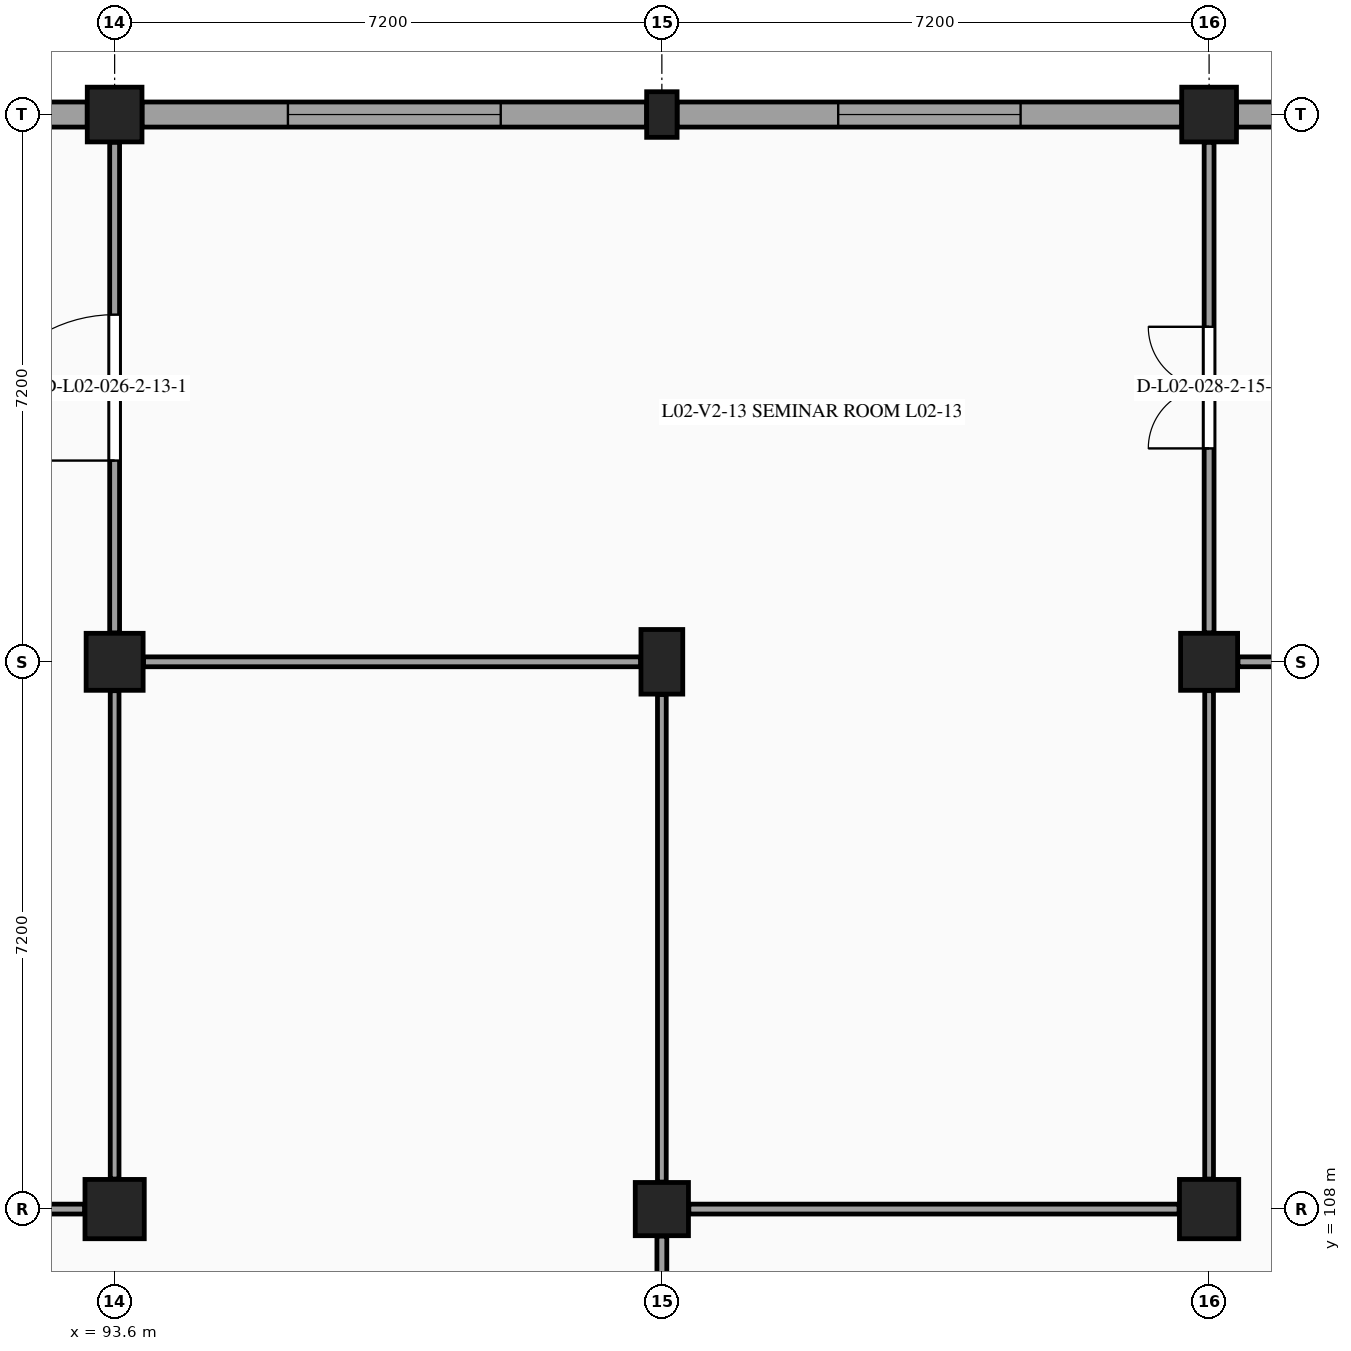
"""IFC4 building model, lengths in metres.
Left out: names, types, materials, properties, quantities, classifications, styles, units other than length and angle.
Written with IfcOpenShell. Run it as: python <this file> out.ifc"""

import sys

from ifc_helpers import new_model, si_unit, direction, frame, frame_2d, origin, origin_2d, place, context, subcontext, project, spatial, rectangle, extrude, element, fill, save


model = new_model("IFC4")
c1 = context("Model", 3, precision=1e-05, world=origin(), true_north=direction((0.0, 1.0)))
c2 = subcontext(c1, "Body", "Model", "MODEL_VIEW")
j1 = project(units=[si_unit("LENGTHUNIT", "METRE"), si_unit("PLANEANGLEUNIT", "RADIAN")], contexts=[c1])
p1 = place(None, origin())
s1 = spatial("IfcSite", under=j1, at=p1, CompositionType="ELEMENT")
p2 = place(p1, origin())
s2 = spatial("IfcBuilding", under=s1, at=p2, CompositionType="ELEMENT")
p3 = place(p2, frame((0.0, 0.0, 9.9)))
s3 = spatial("IfcBuildingStorey", under=s2, at=p3, CompositionType="ELEMENT", Elevation=9.9)
p4 = place(p3, frame((93.6, 108.0, 0.0), z_axis=(0.0, 0.0, 1.0), x_axis=(1.0, 0.0, 0.0)))
e1 = element("IfcColumn", 1, at=p4, inside=s3, PredefinedType="COLUMN", context=c2, shape_type="SweptSolid", body=[
    extrude(rectangle(XDim=0.78, YDim=0.78, at=origin_2d()), origin(), (0.0, 0.0, 1.0), 4.5),
])
p5 = place(p3, frame((93.6, 115.2, 0.0), z_axis=(0.0, 0.0, 1.0), x_axis=(1.0, 0.0, 0.0)))
e2 = element("IfcColumn", 2, at=p5, inside=s3, PredefinedType="COLUMN", context=c2, shape_type="SweptSolid", body=[
    extrude(rectangle(XDim=0.75, YDim=0.75, at=origin_2d()), origin(), (0.0, 0.0, 1.0), 4.5),
])
p6 = place(p3, frame((93.6, 122.4, 0.0), z_axis=(0.0, 0.0, 1.0), x_axis=(1.0, 0.0, 0.0)))
e3 = element("IfcColumn", 3, at=p6, inside=s3, PredefinedType="COLUMN", context=c2, shape_type="SweptSolid", body=[
    extrude(rectangle(XDim=0.72, YDim=0.72, at=origin_2d()), origin(), (0.0, 0.0, 1.0), 4.5),
])
p7 = place(p3, frame((100.8, 108.0, 0.0), z_axis=(0.0, 0.0, 1.0), x_axis=(1.0, 0.0, 0.0)))
e4 = element("IfcColumn", 4, at=p7, inside=s3, PredefinedType="COLUMN", context=c2, shape_type="SweptSolid", body=[
    extrude(rectangle(XDim=0.7, YDim=0.7, at=origin_2d()), origin(), (0.0, 0.0, 1.0), 4.5),
])
p8 = place(p3, frame((100.8, 115.2, 0.0), z_axis=(0.0, 0.0, 1.0), x_axis=(1.0, 0.0, 0.0)))
e5 = element("IfcColumn", 5, at=p8, inside=s3, PredefinedType="COLUMN", context=c2, shape_type="SweptSolid", body=[
    extrude(rectangle(XDim=0.55, YDim=0.85, at=origin_2d()), origin(), (0.0, 0.0, 1.0), 4.5),
])
p9 = place(p3, frame((100.8, 122.4, 0.0), z_axis=(0.0, 0.0, 1.0), x_axis=(1.0, 0.0, 0.0)))
e6 = element("IfcColumn", 6, at=p9, inside=s3, PredefinedType="PILASTER", context=c2, shape_type="SweptSolid", body=[
    extrude(rectangle(XDim=0.4, YDim=0.6, at=origin_2d()), origin(), (0.0, 0.0, 1.0), 4.5),
])
p10 = place(p3, frame((108.0, 108.0, 0.0), z_axis=(0.0, 0.0, 1.0), x_axis=(1.0, 0.0, 0.0)))
e7 = element("IfcColumn", 7, at=p10, inside=s3, PredefinedType="COLUMN", context=c2, shape_type="SweptSolid", body=[
    extrude(rectangle(XDim=0.78, YDim=0.78, at=origin_2d()), origin(), (0.0, 0.0, 1.0), 4.5),
])
p11 = place(p3, frame((108.0, 115.2, 0.0), z_axis=(0.0, 0.0, 1.0), x_axis=(1.0, 0.0, 0.0)))
e8 = element("IfcColumn", 8, at=p11, inside=s3, PredefinedType="COLUMN", context=c2, shape_type="SweptSolid", body=[
    extrude(rectangle(XDim=0.75, YDim=0.75, at=origin_2d()), origin(), (0.0, 0.0, 1.0), 4.5),
])
p12 = place(p3, frame((108.0, 122.4, 0.0), z_axis=(0.0, 0.0, 1.0), x_axis=(1.0, 0.0, 0.0)))
e9 = element("IfcColumn", 9, at=p12, inside=s3, PredefinedType="COLUMN", context=c2, shape_type="SweptSolid", body=[
    extrude(rectangle(XDim=0.72, YDim=0.72, at=origin_2d()), origin(), (0.0, 0.0, 1.0), 4.5),
])
p13 = place(p3, frame((86.6, 122.4, 0.0), z_axis=(0.0, 0.0, 1.0), x_axis=(1.0, 0.0, 0.0)))
e10 = element("IfcWall", 10, at=p13, inside=s3, PredefinedType="STANDARD", context=c2, shape_type="SweptSolid", body=[
    extrude(rectangle(XDim=6.64, YDim=0.33, at=frame_2d((3.32, 0.0))), origin(), (0.0, 0.0, 1.0), 3.47),
])
p14 = place(p13, frame((1.72, 0.0, 0.98)))
e11 = element("IfcOpeningElement", 11, at=p14, cuts=e10, PredefinedType="OPENING", context=c2, shape_type="SweptSolid", body=[
    extrude(rectangle(XDim=3.2, YDim=1.45, at=frame_2d((1.6, 0.725))), frame((0.0, 0.175, 0.0), z_axis=(0.0, -1.0, 0.0), x_axis=(1.0, 0.0, 0.0)), (0.0, 0.0, 1.0), 0.35),
])
p15 = place(p3, frame((93.96, 122.4, 0.0), z_axis=(0.0, 0.0, 1.0), x_axis=(1.0, 0.0, 0.0)))
e12 = element("IfcWall", 12, at=p15, inside=s3, PredefinedType="STANDARD", context=c2, shape_type="SweptSolid", body=[
    extrude(rectangle(XDim=6.64, YDim=0.33, at=frame_2d((3.32, 0.0))), origin(), (0.0, 0.0, 1.0), 3.47),
])
p16 = place(p15, frame((1.92, 0.0, 0.98)))
e13 = element("IfcOpeningElement", 13, at=p16, cuts=e12, PredefinedType="OPENING", context=c2, shape_type="SweptSolid", body=[
    extrude(rectangle(XDim=2.8, YDim=1.45, at=frame_2d((1.4, 0.725))), frame((0.0, 0.175, 0.0), z_axis=(0.0, -1.0, 0.0), x_axis=(1.0, 0.0, 0.0)), (0.0, 0.0, 1.0), 0.35),
])
p17 = place(p3, frame((101.0, 122.4, 0.0), z_axis=(0.0, 0.0, 1.0), x_axis=(1.0, 0.0, 0.0)))
e14 = element("IfcWall", 14, at=p17, inside=s3, PredefinedType="STANDARD", context=c2, shape_type="SweptSolid", body=[
    extrude(rectangle(XDim=6.64, YDim=0.33, at=frame_2d((3.32, 0.0))), origin(), (0.0, 0.0, 1.0), 3.47),
])
p18 = place(p17, frame((2.12, 0.0, 0.98)))
e15 = element("IfcOpeningElement", 15, at=p18, cuts=e14, PredefinedType="OPENING", context=c2, shape_type="SweptSolid", body=[
    extrude(rectangle(XDim=2.4, YDim=1.4, at=frame_2d((1.2, 0.7))), frame((0.0, 0.175, 0.0), z_axis=(0.0, -1.0, 0.0), x_axis=(1.0, 0.0, 0.0)), (0.0, 0.0, 1.0), 0.35),
])
p19 = place(p3, frame((108.36, 122.4, 0.0), z_axis=(0.0, 0.0, 1.0), x_axis=(1.0, 0.0, 0.0)))
e16 = element("IfcWall", 16, at=p19, inside=s3, PredefinedType="STANDARD", context=c2, shape_type="SweptSolid", body=[
    extrude(rectangle(XDim=6.64, YDim=0.33, at=frame_2d((3.32, 0.0))), origin(), (0.0, 0.0, 1.0), 3.47),
])
p20 = place(p19, frame((0.92, 0.0, 0.98)))
e17 = element("IfcOpeningElement", 17, at=p20, cuts=e16, PredefinedType="OPENING", context=c2, shape_type="SweptSolid", body=[
    extrude(rectangle(XDim=4.8, YDim=1.8, at=frame_2d((2.4, 0.9))), frame((0.0, 0.175, 0.0), z_axis=(0.0, -1.0, 0.0), x_axis=(1.0, 0.0, 0.0)), (0.0, 0.0, 1.0), 0.35),
])
p21 = place(p3, frame((86.755, 108.0, 0.0), z_axis=(0.0, 0.0, 1.0), x_axis=(1.0, 0.0, 0.0)))
e18 = element("IfcWall", 18, at=p21, inside=s3, PredefinedType="PARTITIONING", context=c2, shape_type="SweptSolid", body=[
    extrude(rectangle(XDim=6.45, YDim=0.13, at=frame_2d((3.225, 0.0))), origin(), (0.0, 0.0, 1.0), 3.505),
])
p22 = place(p3, frame((93.6, 108.395, 0.0), z_axis=(0.0, 0.0, 1.0), x_axis=(0.0, 1.0, 0.0)))
e19 = element("IfcWall", 19, at=p22, inside=s3, PredefinedType="PARTITIONING", context=c2, shape_type="SweptSolid", body=[
    extrude(rectangle(XDim=6.425, YDim=0.115, at=frame_2d((3.212, 0.0))), origin(), (0.0, 0.0, 1.0), 3.535),
])
p23 = place(p3, frame((93.6, 115.58, 0.0), z_axis=(0.0, 0.0, 1.0), x_axis=(0.0, 1.0, 0.0)))
e20 = element("IfcWall", 20, at=p23, inside=s3, PredefinedType="PARTITIONING", context=c2, shape_type="SweptSolid", body=[
    extrude(rectangle(XDim=6.455, YDim=0.13, at=frame_2d((3.228, 0.0))), origin(), (0.0, 0.0, 1.0), 3.53),
])
p24 = place(p23, frame((2.268, 0.0, 0.0)))
e21 = element("IfcOpeningElement", 21, at=p24, cuts=e20, PredefinedType="OPENING", context=c2, shape_type="SweptSolid", body=[
    extrude(rectangle(XDim=1.92, YDim=2.35, at=frame_2d((0.96, 1.175))), frame((0.0, 0.075, 0.0), z_axis=(0.0, -1.0, 0.0), x_axis=(1.0, 0.0, 0.0)), (0.0, 0.0, 1.0), 0.15),
])
p25 = place(p3, frame((100.8, 101.165, 0.0), z_axis=(0.0, 0.0, 1.0), x_axis=(0.0, 1.0, 0.0)))
e22 = element("IfcWall", 22, at=p25, inside=s3, PredefinedType="PARTITIONING", context=c2, shape_type="SweptSolid", body=[
    extrude(rectangle(XDim=6.48, YDim=0.13, at=frame_2d((3.24, 0.0))), origin(), (0.0, 0.0, 1.0), 3.54),
])
p26 = place(p25, frame((2.36, 0.0, 0.0)))
e23 = element("IfcOpeningElement", 23, at=p26, cuts=e22, PredefinedType="OPENING", context=c2, shape_type="SweptSolid", body=[
    extrude(rectangle(XDim=1.76, YDim=2.3, at=frame_2d((0.88, 1.15))), frame((0.0, 0.075, 0.0), z_axis=(0.0, -1.0, 0.0), x_axis=(1.0, 0.0, 0.0)), (0.0, 0.0, 1.0), 0.15),
])
p27 = place(p3, frame((100.8, 108.355, 0.0), z_axis=(0.0, 0.0, 1.0), x_axis=(0.0, 1.0, 0.0)))
e24 = element("IfcWall", 24, at=p27, inside=s3, PredefinedType="PARTITIONING", context=c2, shape_type="SweptSolid", body=[
    extrude(rectangle(XDim=6.415, YDim=0.115, at=frame_2d((3.208, 0.0))), origin(), (0.0, 0.0, 1.0), 3.535),
])
p28 = place(p3, frame((93.98, 115.2, 0.0), z_axis=(0.0, 0.0, 1.0), x_axis=(1.0, 0.0, 0.0)))
e25 = element("IfcWall", 25, at=p28, inside=s3, PredefinedType="PARTITIONING", context=c2, shape_type="SweptSolid", body=[
    extrude(rectangle(XDim=6.54, YDim=0.13, at=frame_2d((3.27, 0.0))), origin(), (0.0, 0.0, 1.0), 3.525),
])
p29 = place(p3, frame((101.155, 108.0, 0.0), z_axis=(0.0, 0.0, 1.0), x_axis=(1.0, 0.0, 0.0)))
e26 = element("IfcWall", 26, at=p29, inside=s3, PredefinedType="PARTITIONING", context=c2, shape_type="SweptSolid", body=[
    extrude(rectangle(XDim=6.45, YDim=0.13, at=frame_2d((3.225, 0.0))), origin(), (0.0, 0.0, 1.0), 3.565),
])
p30 = place(p3, frame((108.0, 108.395, 0.0), z_axis=(0.0, 0.0, 1.0), x_axis=(0.0, 1.0, 0.0)))
e27 = element("IfcWall", 27, at=p30, inside=s3, PredefinedType="PARTITIONING", context=c2, shape_type="SweptSolid", body=[
    extrude(rectangle(XDim=6.425, YDim=0.115, at=frame_2d((3.212, 0.0))), origin(), (0.0, 0.0, 1.0), 3.535),
])
p31 = place(p3, frame((108.0, 115.58, 0.0), z_axis=(0.0, 0.0, 1.0), x_axis=(0.0, 1.0, 0.0)))
e28 = element("IfcWall", 28, at=p31, inside=s3, PredefinedType="PARTITIONING", context=c2, shape_type="SweptSolid", body=[
    extrude(rectangle(XDim=6.455, YDim=0.13, at=frame_2d((3.228, 0.0))), origin(), (0.0, 0.0, 1.0), 3.53),
])
p32 = place(p31, frame((2.427, 0.0, 0.0)))
e29 = element("IfcOpeningElement", 29, at=p32, cuts=e28, PredefinedType="OPENING", context=c2, shape_type="SweptSolid", body=[
    extrude(rectangle(XDim=1.6, YDim=2.2, at=frame_2d((0.8, 1.1))), frame((0.0, 0.075, 0.0), z_axis=(0.0, -1.0, 0.0), x_axis=(1.0, 0.0, 0.0)), (0.0, 0.0, 1.0), 0.15),
])
p33 = place(p3, frame((108.38, 115.2, 0.0), z_axis=(0.0, 0.0, 1.0), x_axis=(1.0, 0.0, 0.0)))
e30 = element("IfcWall", 30, at=p33, inside=s3, PredefinedType="PARTITIONING", context=c2, shape_type="SweptSolid", body=[
    extrude(rectangle(XDim=6.54, YDim=0.13, at=frame_2d((3.27, 0.0))), origin(), (0.0, 0.0, 1.0), 3.575),
])
p34 = place(p16, origin())
e31 = element("IfcWindow", 31, at=p34, inside=s3, PartitioningType="SINGLE_PANEL", PredefinedType="WINDOW", context=c2, shape_type="SweptSolid", body=[
    extrude(rectangle(XDim=2.8, YDim=1.45, at=frame_2d((1.4, 0.725))), frame((0.0, -0.03, 0.0), z_axis=(0.0, -1.0, 0.0), x_axis=(1.0, 0.0, 0.0)), (0.0, 0.0, 1.0), 0.06),
])
fill(e13, e31)
p35 = place(p18, origin())
e32 = element("IfcWindow", 32, at=p35, inside=s3, PartitioningType="SINGLE_PANEL", PredefinedType="WINDOW", context=c2, shape_type="SweptSolid", body=[
    extrude(rectangle(XDim=2.4, YDim=1.4, at=frame_2d((1.2, 0.7))), frame((0.0, -0.03, 0.0), z_axis=(0.0, -1.0, 0.0), x_axis=(1.0, 0.0, 0.0)), (0.0, 0.0, 1.0), 0.06),
])
fill(e15, e32)
p36 = place(p24, origin())
e33 = element("IfcDoor", 33, at=p36, inside=s3, OperationType="SINGLE_SWING_LEFT", PredefinedType="DOOR", context=c2, shape_type="SweptSolid", body=[
    extrude(rectangle(XDim=1.92, YDim=2.35, at=frame_2d((0.96, 1.175))), frame((0.0, 0.025, 0.0), z_axis=(0.0, -1.0, 0.0), x_axis=(1.0, 0.0, 0.0)), (0.0, 0.0, 1.0), 0.05),
])
fill(e21, e33)
p37 = place(p32, origin())
e34 = element("IfcDoor", 34, at=p37, inside=s3, OperationType="DOUBLE_DOOR_SINGLE_SWING", PredefinedType="DOOR", context=c2, shape_type="SweptSolid", body=[
    extrude(rectangle(XDim=1.6, YDim=2.2, at=frame_2d((0.8, 1.1))), frame((0.0, 0.025, 0.0), z_axis=(0.0, -1.0, 0.0), x_axis=(1.0, 0.0, 0.0)), (0.0, 0.0, 1.0), 0.05),
])
fill(e29, e34)
save(model, sys.argv[1])
